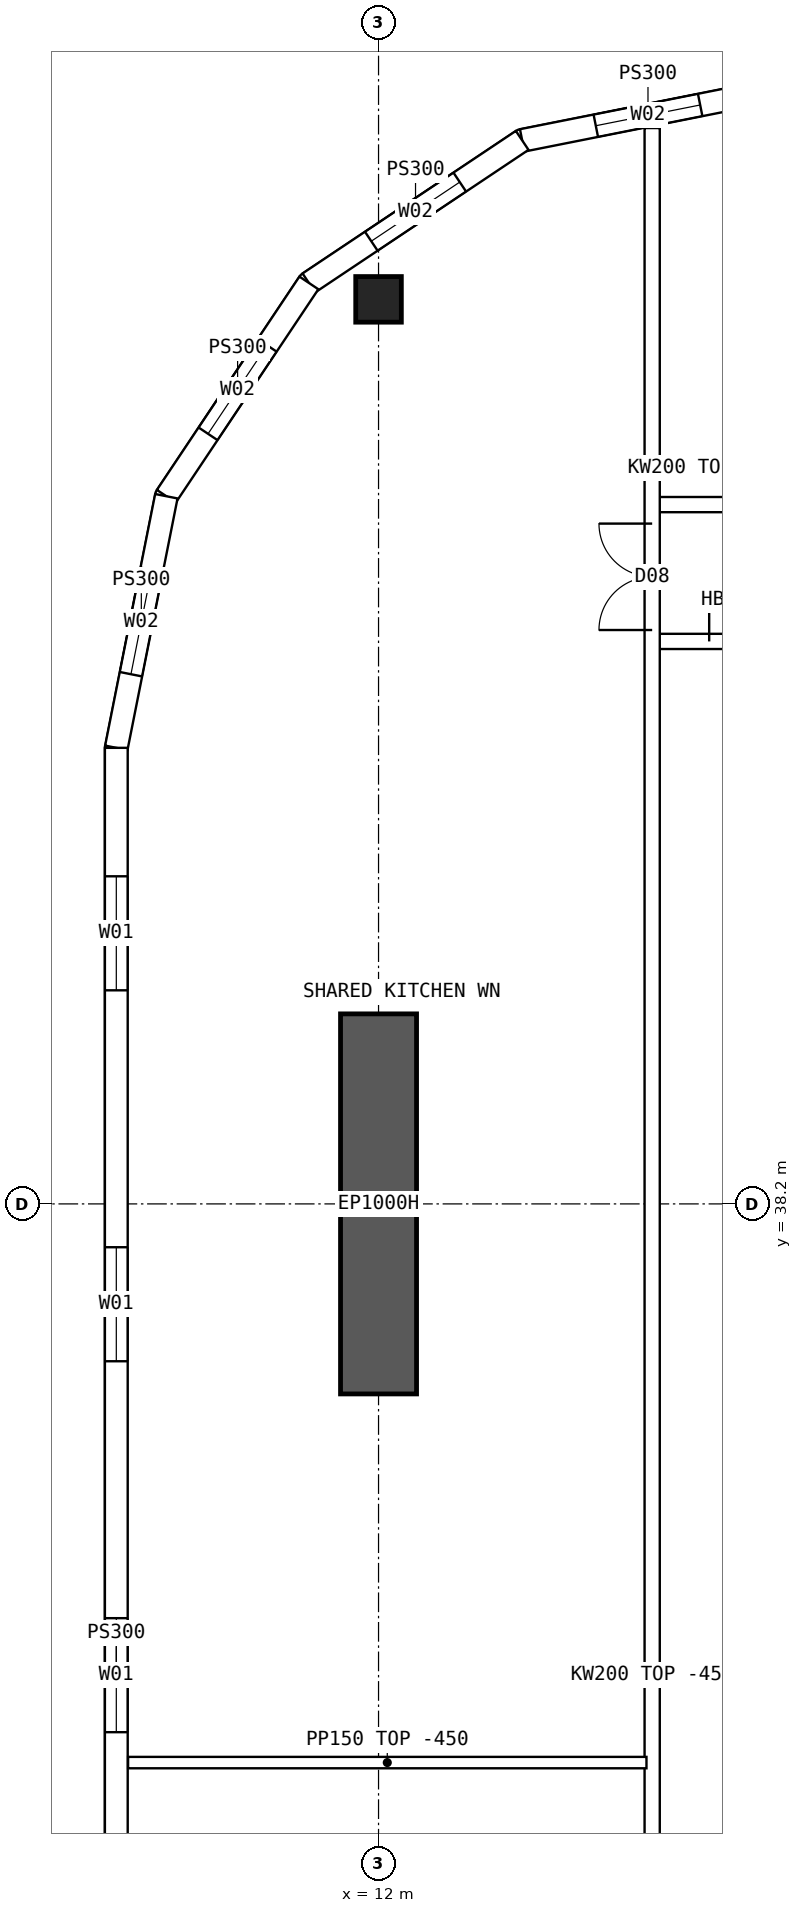
"""IFC4 building model, lengths in metres.
Left out: names, types, materials, properties, quantities, classifications, styles, units other than length and angle.
Written with IfcOpenShell. Run it as: python <this file> out.ifc"""

import sys

from ifc_helpers import new_model, si_unit, direction, frame, frame_2d, origin, origin_2d, place, context, subcontext, project, spatial, polyline, rectangle, hollow_rectangle, outline, extrude, element, fill, save


model = new_model("IFC4")
c1 = context("Model", 3, precision=1e-05, world=origin(), true_north=direction((0.0, 1.0)))
c2 = subcontext(c1, "Body", "Model", "MODEL_VIEW")
j1 = project(units=[si_unit("LENGTHUNIT", "METRE"), si_unit("PLANEANGLEUNIT", "RADIAN")], contexts=[c1])
p1 = place(None, origin())
s1 = spatial("IfcSite", under=j1, at=p1, CompositionType="ELEMENT")
p2 = place(p1, origin())
s2 = spatial("IfcBuilding", under=s1, at=p2, CompositionType="ELEMENT")
p3 = place(p2, frame((0.0, 0.0, 212.8)))
s3 = spatial("IfcBuildingStorey", under=s2, at=p3, CompositionType="ELEMENT", Elevation=212.8)
p4 = place(p3, frame((12.0, 50.1, 0.0), z_axis=(0.0, 0.0, 1.0), x_axis=(1.0, 0.0, 0.0)))
e1 = element("IfcColumn", 1, at=p4, inside=s3, PredefinedType="COLUMN", context=c2, shape_type="SweptSolid", body=[
    extrude(hollow_rectangle(XDim=0.6, YDim=0.6, WallThickness=0.06, at=origin_2d()), origin(), (0.0, 0.0, 1.0), 3.75),
])
p5 = place(p3, frame((12.0, 35.7, 0.0), z_axis=(0.0, 0.0, 1.0), x_axis=(0.0, 1.0, 0.0)))
e2 = element("IfcWall", 2, at=p5, inside=s3, PredefinedType="SHEAR", context=c2, shape_type="SweptSolid", body=[
    extrude(rectangle(XDim=5.0, YDim=1.0, at=frame_2d((2.5, 0.0))), origin(), (0.0, 0.0, 1.0), 3.75),
])
p6 = place(p3, frame((8.55, 44.2, 0.0), z_axis=(0.0, 0.0, 1.0), x_axis=(0.0, -1.0, 0.0)))
e3 = element("IfcWall", 3, at=p6, inside=s3, PredefinedType="SOLIDWALL", context=c2, shape_type="SweptSolid", body=[
    extrude(outline(polyline([(-0.015, -0.15), (24.415, -0.15), (24.385, 0.15), (0.015, 0.15), (-0.015, -0.15)])), origin(), (0.0, 0.0, 1.0), 3.3),
])
p7 = place(p6, frame((1.69, 0.0, 0.9)))
e4 = element("IfcOpeningElement", 4, at=p7, cuts=e3, PredefinedType="OPENING", context=c2, shape_type="SweptSolid", body=[
    extrude(rectangle(XDim=1.5, YDim=2.0, at=frame_2d((0.75, 1.0))), frame((0.0, 0.16, 0.0), z_axis=(0.0, -1.0, 0.0), x_axis=(1.0, 0.0, 0.0)), (0.0, 0.0, 1.0), 0.32),
])
p8 = place(p6, frame((6.57, 0.0, 0.9)))
e5 = element("IfcOpeningElement", 5, at=p8, cuts=e3, PredefinedType="OPENING", context=c2, shape_type="SweptSolid", body=[
    extrude(rectangle(XDim=1.5, YDim=2.0, at=frame_2d((0.75, 1.0))), frame((0.0, 0.16, 0.0), z_axis=(0.0, -1.0, 0.0), x_axis=(1.0, 0.0, 0.0)), (0.0, 0.0, 1.0), 0.32),
])
p9 = place(p6, frame((11.45, 0.0, 0.9)))
e6 = element("IfcOpeningElement", 6, at=p9, cuts=e3, PredefinedType="OPENING", context=c2, shape_type="SweptSolid", body=[
    extrude(rectangle(XDim=1.5, YDim=2.0, at=frame_2d((0.75, 1.0))), frame((0.0, 0.16, 0.0), z_axis=(0.0, -1.0, 0.0), x_axis=(1.0, 0.0, 0.0)), (0.0, 0.0, 1.0), 0.32),
])
p10 = place(p6, frame((16.33, 0.0, 0.9)))
e7 = element("IfcOpeningElement", 7, at=p10, cuts=e3, PredefinedType="OPENING", context=c2, shape_type="SweptSolid", body=[
    extrude(rectangle(XDim=1.5, YDim=2.0, at=frame_2d((0.75, 1.0))), frame((0.0, 0.16, 0.0), z_axis=(0.0, -1.0, 0.0), x_axis=(1.0, 0.0, 0.0)), (0.0, 0.0, 1.0), 0.32),
])
p11 = place(p6, frame((21.21, 0.0, 0.9)))
e8 = element("IfcOpeningElement", 8, at=p11, cuts=e3, PredefinedType="OPENING", context=c2, shape_type="SweptSolid", body=[
    extrude(rectangle(XDim=1.5, YDim=2.0, at=frame_2d((0.75, 1.0))), frame((0.0, 0.16, 0.0), z_axis=(0.0, -1.0, 0.0), x_axis=(1.0, 0.0, 0.0)), (0.0, 0.0, 1.0), 0.32),
])
p12 = place(p3, frame((17.2, 52.85, 0.0), z_axis=(0.0, 0.0, 1.0), x_axis=(-0.98078325777, -0.195100490205, 0.0)))
e9 = element("IfcWall", 9, at=p12, inside=s3, PredefinedType="SOLIDWALL", context=c2, shape_type="SweptSolid", body=[
    extrude(outline(polyline([(-0.03, -0.15), (3.405, -0.15), (3.345, 0.15), (0.03, 0.15), (-0.03, -0.15)])), origin(), (0.0, 0.0, 1.0), 3.3),
])
p13 = place(p12, frame((0.988, 0.0, 0.9)))
e10 = element("IfcOpeningElement", 10, at=p13, cuts=e9, PredefinedType="OPENING", context=c2, shape_type="SweptSolid", body=[
    extrude(rectangle(XDim=1.4, YDim=1.8, at=frame_2d((0.7, 0.9))), frame((0.0, 0.16, 0.0), z_axis=(0.0, -1.0, 0.0), x_axis=(1.0, 0.0, 0.0)), (0.0, 0.0, 1.0), 0.32),
])
p14 = place(p3, frame((13.89, 52.192, 0.0), z_axis=(0.0, 0.0, 1.0), x_axis=(-0.831460037396, -0.555584562613, 0.0)))
e11 = element("IfcWall", 11, at=p14, inside=s3, PredefinedType="SOLIDWALL", context=c2, shape_type="SweptSolid", body=[
    extrude(outline(polyline([(-0.03, -0.15), (3.405, -0.15), (3.345, 0.15), (0.03, 0.15), (-0.03, -0.15)])), origin(), (0.0, 0.0, 1.0), 3.3),
])
p15 = place(p14, frame((0.988, 0.0, 0.9)))
e12 = element("IfcOpeningElement", 12, at=p15, cuts=e11, PredefinedType="OPENING", context=c2, shape_type="SweptSolid", body=[
    extrude(rectangle(XDim=1.4, YDim=1.8, at=frame_2d((0.7, 0.9))), frame((0.0, 0.16, 0.0), z_axis=(0.0, -1.0, 0.0), x_axis=(1.0, 0.0, 0.0)), (0.0, 0.0, 1.0), 0.32),
])
p16 = place(p3, frame((11.083, 50.316, 0.0), z_axis=(0.0, 0.0, 1.0), x_axis=(-0.555567969291, -0.831471124873, 0.0)))
e13 = element("IfcWall", 13, at=p16, inside=s3, PredefinedType="SOLIDWALL", context=c2, shape_type="SweptSolid", body=[
    extrude(outline(polyline([(-0.03, -0.15), (3.405, -0.15), (3.345, 0.15), (0.03, 0.15), (-0.03, -0.15)])), origin(), (0.0, 0.0, 1.0), 3.3),
])
p17 = place(p16, frame((0.988, 0.0, 0.9)))
e14 = element("IfcOpeningElement", 14, at=p17, cuts=e13, PredefinedType="OPENING", context=c2, shape_type="SweptSolid", body=[
    extrude(rectangle(XDim=1.4, YDim=1.8, at=frame_2d((0.7, 0.9))), frame((0.0, 0.16, 0.0), z_axis=(0.0, -1.0, 0.0), x_axis=(1.0, 0.0, 0.0)), (0.0, 0.0, 1.0), 0.32),
])
p18 = place(p3, frame((9.208, 47.51, 0.0), z_axis=(0.0, 0.0, 1.0), x_axis=(-0.19508664885, -0.980786011034, 0.0)))
e15 = element("IfcWall", 15, at=p18, inside=s3, PredefinedType="SOLIDWALL", context=c2, shape_type="SweptSolid", body=[
    extrude(outline(polyline([(-0.03, -0.15), (3.39, -0.15), (3.36, 0.15), (0.03, 0.15), (-0.03, -0.15)])), origin(), (0.0, 0.0, 1.0), 3.3),
])
p19 = place(p18, frame((0.988, 0.0, 0.9)))
e16 = element("IfcOpeningElement", 16, at=p19, cuts=e15, PredefinedType="OPENING", context=c2, shape_type="SweptSolid", body=[
    extrude(rectangle(XDim=1.4, YDim=1.8, at=frame_2d((0.7, 0.9))), frame((0.0, 0.16, 0.0), z_axis=(0.0, -1.0, 0.0), x_axis=(1.0, 0.0, 0.0)), (0.0, 0.0, 1.0), 0.32),
])
p20 = place(p3, frame((15.6, 47.4, 0.0), z_axis=(0.0, 0.0, 1.0), x_axis=(1.0, 0.0, 0.0)))
e17 = element("IfcWall", 17, at=p20, inside=s3, PredefinedType="SOLIDWALL", context=c2, shape_type="SweptSolid", body=[
    extrude(rectangle(XDim=2.05, YDim=0.2, at=frame_2d((1.025, 0.0))), origin(), (0.0, 0.0, 1.0), 3.3),
])
p21 = place(p20, frame((0.95, 0.0, 0.0)))
e18 = element("IfcOpeningElement", 18, at=p21, cuts=e17, PredefinedType="OPENING", context=c2, shape_type="SweptSolid", body=[
    extrude(rectangle(XDim=0.9, YDim=2.1, at=frame_2d((0.45, 1.05))), frame((0.0, 0.11, 0.0), z_axis=(0.0, -1.0, 0.0), x_axis=(1.0, 0.0, 0.0)), (0.0, 0.0, 1.0), 0.22),
])
p22 = place(p3, frame((15.6, 45.6, 0.0), z_axis=(0.0, 0.0, 1.0), x_axis=(1.0, 0.0, 0.0)))
e19 = element("IfcWall", 19, at=p22, inside=s3, PredefinedType="SOLIDWALL", context=c2, shape_type="SweptSolid", body=[
    extrude(rectangle(XDim=2.05, YDim=0.2, at=frame_2d((1.025, 0.0))), origin(), (0.0, 0.0, 1.0), 3.3),
])
p23 = place(p22, frame((0.75, 0.0, 0.0)))
e20 = element("IfcOpeningElement", 20, at=p23, cuts=e19, PredefinedType="OPENING", context=c2, shape_type="SweptSolid", body=[
    extrude(rectangle(XDim=1.2, YDim=2.1, at=frame_2d((0.6, 1.05))), frame((0.0, 0.11, 0.0), z_axis=(0.0, -1.0, 0.0), x_axis=(1.0, 0.0, 0.0)), (0.0, 0.0, 1.0), 0.22),
])
p24 = place(p3, frame((8.705, 30.85, 0.0), z_axis=(0.0, 0.0, 1.0), x_axis=(1.0, 0.0, 0.0)))
e21 = element("IfcWall", 21, at=p24, inside=s3, PredefinedType="PARTITIONING", context=c2, shape_type="SweptSolid", body=[
    extrude(outline(polyline([(0.0, 0.0), (6.82, 0.0), (6.82, 3.3), (3.597, 3.3), (3.595, 2.85), (2.997, 2.85), (2.995, 3.3), (0.0, 3.3), (0.0, 0.0)])), frame((0.0, 0.075, 0.0), z_axis=(0.0, -1.0, 0.0), x_axis=(1.0, 0.0, 0.0)), (0.0, 0.0, 1.0), 0.15),
])
p25 = place(p3, frame((15.6, 11.646, 0.0), z_axis=(0.0, 0.0, 1.0), x_axis=(0.0, 1.0, 0.0)))
e22 = element("IfcWall", 22, at=p25, inside=s3, PredefinedType="SOLIDWALL", context=c2, shape_type="SweptSolid", body=[
    extrude(rectangle(XDim=40.708, YDim=0.2, at=frame_2d((20.354, 0.0))), origin(), (0.0, 0.0, 1.0), 3.3),
])
p26 = place(p25, frame((13.434, 0.0, 0.0)))
e23 = element("IfcOpeningElement", 23, at=p26, cuts=e22, PredefinedType="OPENING", context=c2, shape_type="SweptSolid", body=[
    extrude(rectangle(XDim=1.2, YDim=2.1, at=frame_2d((0.6, 1.05))), frame((0.0, 0.11, 0.0), z_axis=(0.0, -1.0, 0.0), x_axis=(1.0, 0.0, 0.0)), (0.0, 0.0, 1.0), 0.22),
])
p27 = place(p25, frame((5.104, 0.0, 0.0)))
e24 = element("IfcOpeningElement", 24, at=p27, cuts=e22, PredefinedType="OPENING", context=c2, shape_type="SweptSolid", body=[
    extrude(rectangle(XDim=1.4, YDim=2.1, at=frame_2d((0.7, 1.05))), frame((0.0, 0.11, 0.0), z_axis=(0.0, -1.0, 0.0), x_axis=(1.0, 0.0, 0.0)), (0.0, 0.0, 1.0), 0.22),
])
p28 = place(p25, frame((34.104, 0.0, 0.0)))
e25 = element("IfcOpeningElement", 25, at=p28, cuts=e22, PredefinedType="OPENING", context=c2, shape_type="SweptSolid", body=[
    extrude(rectangle(XDim=1.4, YDim=2.1, at=frame_2d((0.7, 1.05))), frame((0.0, 0.11, 0.0), z_axis=(0.0, -1.0, 0.0), x_axis=(1.0, 0.0, 0.0)), (0.0, 0.0, 1.0), 0.22),
])
p29 = place(p7, origin())
e26 = element("IfcWindow", 26, at=p29, inside=s3, PartitioningType="SINGLE_PANEL", PredefinedType="WINDOW", context=c2, shape_type="SweptSolid", body=[
    extrude(rectangle(XDim=1.5, YDim=2.0, at=frame_2d((0.75, 1.0))), frame((0.0, 0.03, 0.0), z_axis=(0.0, -1.0, 0.0), x_axis=(1.0, 0.0, 0.0)), (0.0, 0.0, 1.0), 0.06),
])
fill(e4, e26)
p30 = place(p8, origin())
e27 = element("IfcWindow", 27, at=p30, inside=s3, PartitioningType="SINGLE_PANEL", PredefinedType="WINDOW", context=c2, shape_type="SweptSolid", body=[
    extrude(rectangle(XDim=1.5, YDim=2.0, at=frame_2d((0.75, 1.0))), frame((0.0, 0.03, 0.0), z_axis=(0.0, -1.0, 0.0), x_axis=(1.0, 0.0, 0.0)), (0.0, 0.0, 1.0), 0.06),
])
fill(e5, e27)
p31 = place(p9, origin())
e28 = element("IfcWindow", 28, at=p31, inside=s3, PartitioningType="SINGLE_PANEL", PredefinedType="WINDOW", context=c2, shape_type="SweptSolid", body=[
    extrude(rectangle(XDim=1.5, YDim=2.0, at=frame_2d((0.75, 1.0))), frame((0.0, 0.03, 0.0), z_axis=(0.0, -1.0, 0.0), x_axis=(1.0, 0.0, 0.0)), (0.0, 0.0, 1.0), 0.06),
])
fill(e6, e28)
p32 = place(p13, origin())
e29 = element("IfcWindow", 29, at=p32, inside=s3, PartitioningType="SINGLE_PANEL", PredefinedType="WINDOW", context=c2, shape_type="SweptSolid", body=[
    extrude(rectangle(XDim=1.4, YDim=1.8, at=frame_2d((0.7, 0.9))), frame((0.0, 0.03, 0.0), z_axis=(0.0, -1.0, 0.0), x_axis=(1.0, 0.0, 0.0)), (0.0, 0.0, 1.0), 0.06),
])
fill(e10, e29)
p33 = place(p15, origin())
e30 = element("IfcWindow", 30, at=p33, inside=s3, PartitioningType="SINGLE_PANEL", PredefinedType="WINDOW", context=c2, shape_type="SweptSolid", body=[
    extrude(rectangle(XDim=1.4, YDim=1.8, at=frame_2d((0.7, 0.9))), frame((0.0, 0.03, 0.0), z_axis=(0.0, -1.0, 0.0), x_axis=(1.0, 0.0, 0.0)), (0.0, 0.0, 1.0), 0.06),
])
fill(e12, e30)
p34 = place(p17, origin())
e31 = element("IfcWindow", 31, at=p34, inside=s3, PartitioningType="SINGLE_PANEL", PredefinedType="WINDOW", context=c2, shape_type="SweptSolid", body=[
    extrude(rectangle(XDim=1.4, YDim=1.8, at=frame_2d((0.7, 0.9))), frame((0.0, 0.03, 0.0), z_axis=(0.0, -1.0, 0.0), x_axis=(1.0, 0.0, 0.0)), (0.0, 0.0, 1.0), 0.06),
])
fill(e14, e31)
p35 = place(p19, origin())
e32 = element("IfcWindow", 32, at=p35, inside=s3, PartitioningType="SINGLE_PANEL", PredefinedType="WINDOW", context=c2, shape_type="SweptSolid", body=[
    extrude(rectangle(XDim=1.4, YDim=1.8, at=frame_2d((0.7, 0.9))), frame((0.0, 0.03, 0.0), z_axis=(0.0, -1.0, 0.0), x_axis=(1.0, 0.0, 0.0)), (0.0, 0.0, 1.0), 0.06),
])
fill(e16, e32)
p36 = place(p23, origin())
e33 = element("IfcDoor", 33, at=p36, inside=s3, OperationType="DOUBLE_DOOR_SINGLE_SWING", PredefinedType="DOOR", context=c2, shape_type="SweptSolid", body=[
    extrude(rectangle(XDim=1.2, YDim=2.1, at=frame_2d((0.6, 1.05))), frame((0.0, 0.025, 0.0), z_axis=(0.0, -1.0, 0.0), x_axis=(1.0, 0.0, 0.0)), (0.0, 0.0, 1.0), 0.05),
])
fill(e20, e33)
p37 = place(p28, origin())
e34 = element("IfcDoor", 34, at=p37, inside=s3, OperationType="DOUBLE_DOOR_SINGLE_SWING", PredefinedType="DOOR", context=c2, shape_type="SweptSolid", body=[
    extrude(rectangle(XDim=1.4, YDim=2.1, at=frame_2d((0.7, 1.05))), frame((0.0, 0.025, 0.0), z_axis=(0.0, -1.0, 0.0), x_axis=(1.0, 0.0, 0.0)), (0.0, 0.0, 1.0), 0.05),
])
fill(e25, e34)
save(model, sys.argv[1])
